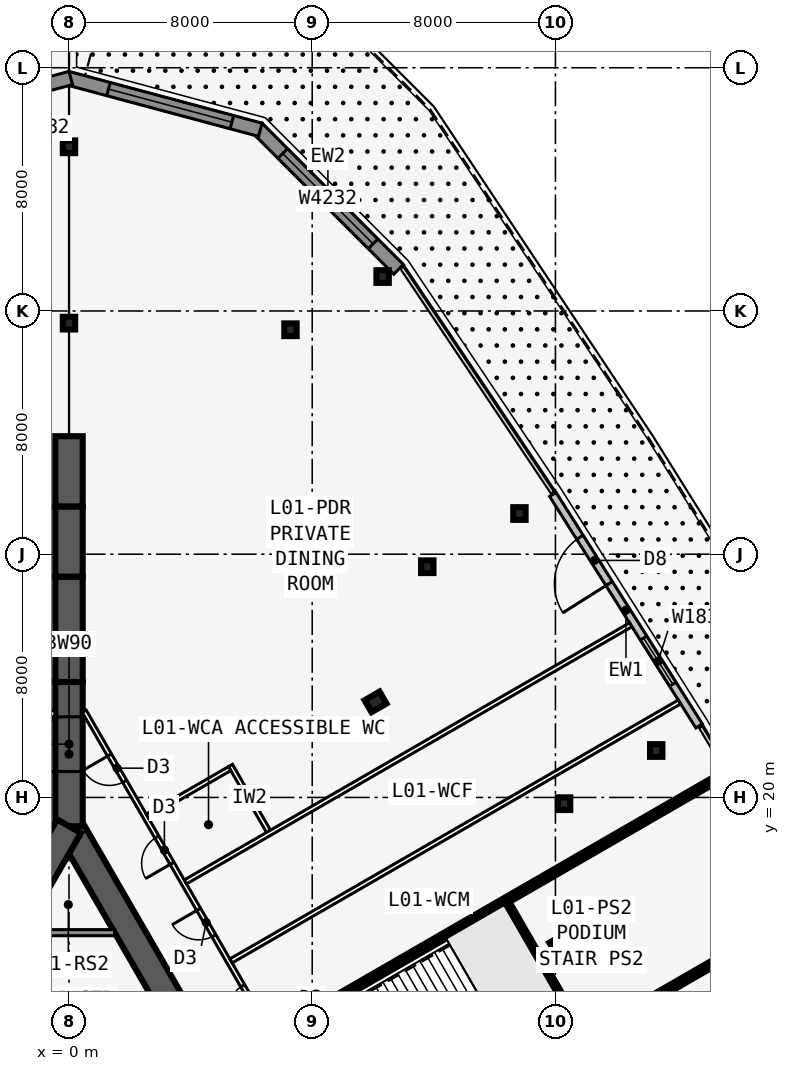
"""IFC4 building model, lengths in metres.
Left out: names, types, materials, properties, quantities, classifications, styles, units other than length and angle.
Written with IfcOpenShell. Run it as: python <this file> out.ifc"""

import sys

from ifc_helpers import new_model, si_unit, direction, frame, frame_2d, origin, origin_2d, place, context, subcontext, project, spatial, rectangle, i_section, extrude, element, fill, save


model = new_model("IFC4")
c1 = context("Model", 3, precision=1e-05, world=origin(), true_north=direction((0.0, 1.0)))
c2 = subcontext(c1, "Body", "Model", "MODEL_VIEW")
j1 = project(units=[si_unit("LENGTHUNIT", "METRE"), si_unit("PLANEANGLEUNIT", "RADIAN")], contexts=[c1])
p1 = place(None, origin())
s1 = spatial("IfcSite", under=j1, at=p1, CompositionType="ELEMENT")
p2 = place(p1, origin())
s2 = spatial("IfcBuilding", under=s1, at=p2, CompositionType="ELEMENT")
p3 = place(p2, frame((0.0, 0.0, 6.0)))
s3 = spatial("IfcBuildingStorey", under=s2, at=p3, CompositionType="ELEMENT", Elevation=6.0)
p4 = place(p3, frame((16.5, -9.526, 0.0), z_axis=(0.0, 0.0, 1.0), x_axis=(-0.499999749417, 0.866025548458, 0.0)))
e1 = element("IfcWall", 1, at=p4, inside=s3, PredefinedType="SHEAR", context=c2, shape_type="SweptSolid", body=[
    extrude(rectangle(XDim=33.0, YDim=0.9, at=frame_2d((16.5, 0.0))), origin(), (0.0, 0.0, 1.0), 5.0),
])
p5 = place(p4, frame((14.15, 0.0, 0.0)))
e2 = element("IfcOpeningElement", 2, at=p5, cuts=e1, PredefinedType="OPENING", context=c2, shape_type="SweptSolid", body=[
    extrude(rectangle(XDim=1.8, YDim=2.13, at=frame_2d((0.9, 1.065))), frame((0.0, 0.46, 0.0), z_axis=(0.0, -1.0, 0.0), x_axis=(1.0, 0.0, 0.0)), (0.0, 0.0, 1.0), 0.92),
])
p6 = place(p4, frame((12.6, 0.0, 0.0)))
e3 = element("IfcOpeningElement", 3, at=p6, cuts=e1, PredefinedType="OPENING", context=c2, shape_type="SweptSolid", body=[
    extrude(rectangle(XDim=1.0, YDim=2.13, at=frame_2d((0.5, 1.065))), frame((0.0, 0.46, 0.0), z_axis=(0.0, -1.0, 0.0), x_axis=(1.0, 0.0, 0.0)), (0.0, 0.0, 1.0), 0.92),
])
p7 = place(p3, frame((0.0, 19.052, 0.0), z_axis=(0.0, 0.0, 1.0), x_axis=(-0.499999749417, -0.866025548458, 0.0)))
e4 = element("IfcWall", 4, at=p7, inside=s3, PredefinedType="SHEAR", context=c2, shape_type="SweptSolid", body=[
    extrude(rectangle(XDim=33.0, YDim=0.9, at=frame_2d((16.5, 0.0))), origin(), (0.0, 0.0, 1.0), 5.0),
])
p8 = place(p7, frame((14.15, 0.0, 0.0)))
e5 = element("IfcOpeningElement", 5, at=p8, cuts=e4, PredefinedType="OPENING", context=c2, shape_type="SweptSolid", body=[
    extrude(rectangle(XDim=1.8, YDim=2.13, at=frame_2d((0.9, 1.065))), frame((0.0, 0.46, 0.0), z_axis=(0.0, -1.0, 0.0), x_axis=(1.0, 0.0, 0.0)), (0.0, 0.0, 1.0), 0.92),
])
p9 = place(p7, frame((12.6, 0.0, 0.0)))
e6 = element("IfcOpeningElement", 6, at=p9, cuts=e4, PredefinedType="OPENING", context=c2, shape_type="SweptSolid", body=[
    extrude(rectangle(XDim=1.0, YDim=2.13, at=frame_2d((0.5, 1.065))), frame((0.0, 0.46, 0.0), z_axis=(0.0, -1.0, 0.0), x_axis=(1.0, 0.0, 0.0)), (0.0, 0.0, 1.0), 0.92),
])
p10 = place(p3, frame((0.0, 19.052, 0.0), z_axis=(0.0, 0.0, 1.0), x_axis=(0.0, 1.0, 0.0)))
e7 = element("IfcWall", 7, at=p10, inside=s3, PredefinedType="SHEAR", context=c2, shape_type="SweptSolid", body=[
    extrude(rectangle(XDim=4.746, YDim=0.9, at=frame_2d((2.373, 0.0))), origin(), (0.0, 0.0, 1.0), 5.0),
])
p11 = place(p10, frame((1.8, 0.0, 0.0)))
e8 = element("IfcOpeningElement", 8, at=p11, cuts=e7, PredefinedType="OPENING", context=c2, shape_type="SweptSolid", body=[
    extrude(rectangle(XDim=1.8, YDim=2.13, at=frame_2d((0.9, 1.065))), frame((0.0, 0.46, 0.0), z_axis=(0.0, -1.0, 0.0), x_axis=(1.0, 0.0, 0.0)), (0.0, 0.0, 1.0), 0.92),
])
p12 = place(p3, frame((0.0, 23.799, 0.0), z_axis=(0.0, 0.0, 1.0), x_axis=(0.0, 1.0, 0.0)))
e9 = element("IfcWall", 9, at=p12, inside=s3, PredefinedType="SHEAR", context=c2, shape_type="SweptSolid", body=[
    extrude(rectangle(XDim=1.155, YDim=0.9, at=frame_2d((0.577, 0.0))), origin(), (0.0, 0.0, 1.0), 5.0),
])
p13 = place(p3, frame((0.0, 24.953, 0.0), z_axis=(0.0, 0.0, 1.0), x_axis=(0.0, 1.0, 0.0)))
e10 = element("IfcWall", 10, at=p13, inside=s3, PredefinedType="SHEAR", context=c2, shape_type="SweptSolid", body=[
    extrude(rectangle(XDim=2.309, YDim=0.9, at=frame_2d((1.155, 0.0))), origin(), (0.0, 0.0, 1.0), 5.0),
])
p14 = place(p3, frame((0.0, 27.263, 0.0), z_axis=(0.0, 0.0, 1.0), x_axis=(0.0, 1.0, 0.0)))
e11 = element("IfcWall", 11, at=p14, inside=s3, PredefinedType="SHEAR", context=c2, shape_type="SweptSolid", body=[
    extrude(rectangle(XDim=2.31, YDim=0.9, at=frame_2d((1.155, 0.0))), origin(), (0.0, 0.0, 1.0), 5.0),
])
p15 = place(p3, frame((0.0, 29.572, 0.0), z_axis=(0.0, 0.0, 1.0), x_axis=(0.0, 1.0, 0.0)))
e12 = element("IfcWall", 12, at=p15, inside=s3, PredefinedType="SHEAR", context=c2, shape_type="SweptSolid", body=[
    extrude(rectangle(XDim=2.309, YDim=0.9, at=frame_2d((1.155, 0.0))), origin(), (0.0, 0.0, 1.0), 5.0),
])
for number, where, z_axis, x_axis in (
    (13, (16.137, 15.09, 0.0), (0.0, 0.0, 1.0), (0.866, 0.5, 0.0)),
    (14, (10.083, 23.142, 0.0), (0.0, 0.0, 1.0), (-0.5, 0.866, 0.0)),
):
    element("IfcColumn", number, at=place(p3, frame(where, z_axis=z_axis, x_axis=x_axis)), inside=s3, PredefinedType="COLUMN", context=c2, shape_type="SweptSolid", body=[
        extrude(i_section(OverallWidth=0.455, OverallDepth=0.569, WebThickness=0.078, FlangeThickness=0.125, at=origin_2d()), origin(), (0.0, 0.0, 1.0), 5.0),
    ])
for number, where, z_axis, x_axis in (
    (15, (0.0, 35.6, 0.0), (0.0, 0.0, 1.0), (1.0, 0.0, 0.0)),
    (16, (0.0, 41.4, 0.0), (0.0, 0.0, 1.0), (1.0, 0.0, 0.0)),
    (17, (11.785, 27.588, 0.0), (0.0, 0.0, 1.0), (1.0, 0.0, 0.0)),
    (18, (7.285, 35.383, 0.0), (0.0, 0.0, 1.0), (1.0, 0.0, 0.0)),
    (19, (16.285, 19.794, 0.0), (0.0, 0.0, 1.0), (1.0, 0.0, 0.0)),
    (20, (14.816, 29.338, 0.0), (0.0, 0.0, 1.0), (1.0, 0.0, 0.0)),
    (21, (10.316, 37.133, 0.0), (0.0, 0.0, 1.0), (1.0, 0.0, 0.0)),
    (22, (19.316, 21.544, 0.0), (0.0, 0.0, 1.0), (1.0, 0.0, 0.0)),
):
    element("IfcColumn", number, at=place(p3, frame(where, z_axis=z_axis, x_axis=x_axis)), inside=s3, PredefinedType="COLUMN", context=c2, shape_type="SweptSolid", body=[
        extrude(i_section(OverallWidth=0.406, OverallDepth=0.417, WebThickness=0.03, FlangeThickness=0.048, at=origin_2d()), origin(), (0.0, 0.0, 1.0), 5.0),
    ])
p16 = place(p3, frame((20.726, 22.353, 0.0), z_axis=(0.0, 0.0, 1.0), x_axis=(-0.534212228641, 0.845350397628, 0.0)))
e23 = element("IfcWall", 23, at=p16, inside=s3, PredefinedType="STANDARD", context=c2, shape_type="SweptSolid", body=[
    extrude(rectangle(XDim=9.007, YDim=0.25, at=frame_2d((4.504, 0.0))), origin(), (0.0, 0.0, 1.0), 4.75),
])
p17 = place(p16, frame((1.62, 0.0, 0.6)))
e24 = element("IfcOpeningElement", 24, at=p17, cuts=e23, PredefinedType="OPENING", context=c2, shape_type="SweptSolid", body=[
    extrude(rectangle(XDim=1.8, YDim=3.2, at=frame_2d((0.9, 1.6))), frame((0.0, 0.135, 0.0), z_axis=(0.0, -1.0, 0.0), x_axis=(1.0, 0.0, 0.0)), (0.0, 0.0, 1.0), 0.27),
])
p18 = place(p16, frame((5.539, 0.0, 0.0)))
e25 = element("IfcOpeningElement", 25, at=p18, cuts=e23, PredefinedType="OPENING", context=c2, shape_type="SweptSolid", body=[
    extrude(rectangle(XDim=1.8, YDim=2.4, at=frame_2d((0.9, 1.2))), frame((0.0, 0.135, 0.0), z_axis=(0.0, -1.0, 0.0), x_axis=(1.0, 0.0, 0.0)), (0.0, 0.0, 1.0), 0.27),
])
p19 = place(p3, frame((10.841, 37.369, 0.0), z_axis=(0.0, 0.0, 1.0), x_axis=(-0.7070882144, 0.707125347486, 0.0)))
e26 = element("IfcWall", 26, at=p19, inside=s3, PredefinedType="SOLIDWALL", context=c2, shape_type="SweptSolid", body=[
    extrude(rectangle(XDim=6.575, YDim=0.45, at=frame_2d((3.287, 0.0))), origin(), (0.0, 0.0, 1.0), 4.75),
])
p20 = place(p19, frame((1.188, 0.0, 0.6)))
e27 = element("IfcOpeningElement", 27, at=p20, cuts=e26, PredefinedType="OPENING", context=c2, shape_type="SweptSolid", body=[
    extrude(rectangle(XDim=4.2, YDim=3.2, at=frame_2d((2.1, 1.6))), frame((0.0, 0.235, 0.0), z_axis=(0.0, -1.0, 0.0), x_axis=(1.0, 0.0, 0.0)), (0.0, 0.0, 1.0), 0.47),
])
p21 = place(p3, frame((6.293, 41.96, 0.0), z_axis=(0.0, 0.0, 1.0), x_axis=(-0.96592733332, 0.258813420722, 0.0)))
e28 = element("IfcWall", 28, at=p21, inside=s3, PredefinedType="SOLIDWALL", context=c2, shape_type="SweptSolid", body=[
    extrude(rectangle(XDim=6.575, YDim=0.45, at=frame_2d((3.288, 0.0))), origin(), (0.0, 0.0, 1.0), 4.75),
])
p22 = place(p21, frame((0.969, 0.0, 0.6)))
e29 = element("IfcOpeningElement", 29, at=p22, cuts=e28, PredefinedType="OPENING", context=c2, shape_type="SweptSolid", body=[
    extrude(rectangle(XDim=4.2, YDim=3.2, at=frame_2d((2.1, 1.6))), frame((0.0, 0.235, 0.0), z_axis=(0.0, -1.0, 0.0), x_axis=(1.0, 0.0, 0.0)), (0.0, 0.0, 1.0), 0.47),
])
p23 = place(p3, frame((0.058, 43.661, 0.0), z_axis=(0.0, 0.0, 1.0), x_axis=(-0.96592733332, -0.258813420722, 0.0)))
e30 = element("IfcWall", 30, at=p23, inside=s3, PredefinedType="SOLIDWALL", context=c2, shape_type="SweptSolid", body=[
    extrude(rectangle(XDim=6.575, YDim=0.45, at=frame_2d((3.288, 0.0))), origin(), (0.0, 0.0, 1.0), 4.75),
])
p24 = place(p23, frame((3.056, 0.0, 0.0)))
e31 = element("IfcOpeningElement", 31, at=p24, cuts=e30, PredefinedType="OPENING", context=c2, shape_type="SweptSolid", body=[
    extrude(rectangle(XDim=0.9, YDim=2.13, at=frame_2d((0.45, 1.065))), frame((0.0, 0.235, 0.0), z_axis=(0.0, -1.0, 0.0), x_axis=(1.0, 0.0, 0.0)), (0.0, 0.0, 1.0), 0.47),
])
p25 = place(p23, frame((1.146, 0.0, 0.6)))
e32 = element("IfcOpeningElement", 32, at=p25, cuts=e30, PredefinedType="OPENING", context=c2, shape_type="SweptSolid", body=[
    extrude(rectangle(XDim=1.2, YDim=3.2, at=frame_2d((0.6, 1.6))), frame((0.0, 0.235, 0.0), z_axis=(0.0, -1.0, 0.0), x_axis=(1.0, 0.0, 0.0)), (0.0, 0.0, 1.0), 0.47),
])
p26 = place(p23, frame((4.665, 0.0, 0.6)))
e33 = element("IfcOpeningElement", 33, at=p26, cuts=e30, PredefinedType="OPENING", context=c2, shape_type="SweptSolid", body=[
    extrude(rectangle(XDim=1.2, YDim=3.2, at=frame_2d((0.6, 1.6))), frame((0.0, 0.235, 0.0), z_axis=(0.0, -1.0, 0.0), x_axis=(1.0, 0.0, 0.0)), (0.0, 0.0, 1.0), 0.47),
])
p27 = place(p3, frame((20.027, -10.985, 0.0), z_axis=(0.0, 0.0, 1.0), x_axis=(-0.500001677587, 0.866024435227, 0.0)))
e34 = element("IfcWall", 34, at=p27, inside=s3, PredefinedType="PARTITIONING", context=c2, shape_type="SweptSolid", body=[
    extrude(rectangle(XDim=39.054, YDim=0.15, at=frame_2d((19.527, 0.0))), origin(), (0.0, 0.0, 1.0), 3.808),
])
p28 = place(p27, frame((10.013, 0.0, 0.0)))
e35 = element("IfcOpeningElement", 35, at=p28, cuts=e34, PredefinedType="OPENING", context=c2, shape_type="SweptSolid", body=[
    extrude(rectangle(XDim=1.8, YDim=2.13, at=frame_2d((0.9, 1.065))), frame((0.0, 0.085, 0.0), z_axis=(0.0, -1.0, 0.0), x_axis=(1.0, 0.0, 0.0)), (0.0, 0.0, 1.0), 0.17),
])
p29 = place(p27, frame((23.227, 0.0, 0.0)))
e36 = element("IfcOpeningElement", 36, at=p29, cuts=e34, PredefinedType="OPENING", context=c2, shape_type="SweptSolid", body=[
    extrude(rectangle(XDim=1.8, YDim=2.13, at=frame_2d((0.9, 1.065))), frame((0.0, 0.085, 0.0), z_axis=(0.0, -1.0, 0.0), x_axis=(1.0, 0.0, 0.0)), (0.0, 0.0, 1.0), 0.17),
])
p30 = place(p27, frame((27.627, 0.0, 0.0)))
e37 = element("IfcOpeningElement", 37, at=p30, cuts=e34, PredefinedType="OPENING", context=c2, shape_type="SweptSolid", body=[
    extrude(rectangle(XDim=1.0, YDim=2.13, at=frame_2d((0.5, 1.065))), frame((0.0, 0.085, 0.0), z_axis=(0.0, -1.0, 0.0), x_axis=(1.0, 0.0, 0.0)), (0.0, 0.0, 1.0), 0.17),
])
p31 = place(p27, frame((30.527, 0.0, 0.0)))
e38 = element("IfcOpeningElement", 38, at=p31, cuts=e34, PredefinedType="OPENING", context=c2, shape_type="SweptSolid", body=[
    extrude(rectangle(XDim=1.0, YDim=2.13, at=frame_2d((0.5, 1.065))), frame((0.0, 0.085, 0.0), z_axis=(0.0, -1.0, 0.0), x_axis=(1.0, 0.0, 0.0)), (0.0, 0.0, 1.0), 0.17),
])
p32 = place(p27, frame((33.277, 0.0, 0.0)))
e39 = element("IfcOpeningElement", 39, at=p32, cuts=e34, PredefinedType="OPENING", context=c2, shape_type="SweptSolid", body=[
    extrude(rectangle(XDim=1.0, YDim=2.13, at=frame_2d((0.5, 1.065))), frame((0.0, 0.085, 0.0), z_axis=(0.0, -1.0, 0.0), x_axis=(1.0, 0.0, 0.0)), (0.0, 0.0, 1.0), 0.17),
])
p33 = place(p27, frame((36.39, 0.0, 0.0)))
e40 = element("IfcOpeningElement", 40, at=p33, cuts=e34, PredefinedType="OPENING", context=c2, shape_type="SweptSolid", body=[
    extrude(rectangle(XDim=1.0, YDim=2.13, at=frame_2d((0.5, 1.065))), frame((0.0, 0.085, 0.0), z_axis=(0.0, -1.0, 0.0), x_axis=(1.0, 0.0, 0.0)), (0.0, 0.0, 1.0), 0.17),
])
p34 = place(p3, frame((9.329, 7.695, 0.0), z_axis=(0.0, 0.0, 1.0), x_axis=(0.866030143687, 0.499991790157, 0.0)))
e41 = element("IfcWall", 41, at=p34, inside=s3, PredefinedType="SHEAR", context=c2, shape_type="SweptSolid", body=[
    extrude(rectangle(XDim=17.236, YDim=0.2, at=frame_2d((8.618, 0.0))), origin(), (0.0, 0.0, 1.0), 5.0),
])
p35 = place(p3, frame((6.729, 12.198, 0.0), z_axis=(0.0, 0.0, 1.0), x_axis=(0.866023831254, 0.500002723692, 0.0)))
e42 = element("IfcWall", 42, at=p35, inside=s3, PredefinedType="SHEAR", context=c2, shape_type="SweptSolid", body=[
    extrude(rectangle(XDim=17.167, YDim=0.2, at=frame_2d((8.583, 0.0))), origin(), (0.0, 0.0, 1.0), 5.0),
])
p36 = place(p3, frame((5.329, 14.623, 0.0), z_axis=(0.0, 0.0, 1.0), x_axis=(0.866023280993, 0.500003676764, 0.0)))
e43 = element("IfcWall", 43, at=p36, inside=s3, PredefinedType="PARTITIONING", context=c2, shape_type="SweptSolid", body=[
    extrude(rectangle(XDim=17.033, YDim=0.15, at=frame_2d((8.517, 0.0))), origin(), (0.0, 0.0, 1.0), 3.808),
])
p37 = place(p3, frame((3.829, 17.221, 0.0), z_axis=(0.0, 0.0, 1.0), x_axis=(0.86602357085, 0.500003174723, 0.0)))
e44 = element("IfcWall", 44, at=p37, inside=s3, PredefinedType="PARTITIONING", context=c2, shape_type="SweptSolid", body=[
    extrude(rectangle(XDim=16.914, YDim=0.15, at=frame_2d((8.457, 0.0))), origin(), (0.0, 0.0, 1.0), 4.75),
])
p38 = place(p3, frame((6.562, 18.886, 0.0), z_axis=(0.0, 0.0, 1.0), x_axis=(-0.500004234368, 0.866022959057, 0.0)))
e45 = element("IfcWall", 45, at=p38, inside=s3, PredefinedType="PARTITIONING", context=c2, shape_type="SweptSolid", body=[
    extrude(rectangle(XDim=2.5, YDim=0.15, at=frame_2d((1.25, 0.0))), origin(), (0.0, 0.0, 1.0), 4.75),
])
p39 = place(p3, frame((2.579, 19.386, 0.0), z_axis=(0.0, 0.0, 1.0), x_axis=(0.866022959057, 0.500004234368, 0.0)))
e46 = element("IfcWall", 46, at=p39, inside=s3, PredefinedType="PARTITIONING", context=c2, shape_type="SweptSolid", body=[
    extrude(rectangle(XDim=3.125, YDim=0.15, at=frame_2d((1.562, 0.0))), origin(), (0.0, 0.0, 1.0), 4.75),
])
p40 = place(p3, frame((-0.5, 22.836, 0.0), z_axis=(0.0, 0.0, 1.0), x_axis=(-0.500001677587, -0.866024435227, 0.0)))
e47 = element("IfcWall", 47, at=p40, inside=s3, PredefinedType="PARTITIONING", context=c2, shape_type="SweptSolid", body=[
    extrude(rectangle(XDim=39.054, YDim=0.15, at=frame_2d((19.527, 0.0))), origin(), (0.0, 0.0, 1.0), 3.808),
])
p41 = place(p40, frame((10.013, 0.0, 0.0)))
e48 = element("IfcOpeningElement", 48, at=p41, cuts=e47, PredefinedType="OPENING", context=c2, shape_type="SweptSolid", body=[
    extrude(rectangle(XDim=1.8, YDim=2.13, at=frame_2d((0.9, 1.065))), frame((0.0, 0.085, 0.0), z_axis=(0.0, -1.0, 0.0), x_axis=(1.0, 0.0, 0.0)), (0.0, 0.0, 1.0), 0.17),
])
p42 = place(p40, frame((23.227, 0.0, 0.0)))
e49 = element("IfcOpeningElement", 49, at=p42, cuts=e47, PredefinedType="OPENING", context=c2, shape_type="SweptSolid", body=[
    extrude(rectangle(XDim=1.8, YDim=2.13, at=frame_2d((0.9, 1.065))), frame((0.0, 0.085, 0.0), z_axis=(0.0, -1.0, 0.0), x_axis=(1.0, 0.0, 0.0)), (0.0, 0.0, 1.0), 0.17),
])
p43 = place(p40, frame((27.627, 0.0, 0.0)))
e50 = element("IfcOpeningElement", 50, at=p43, cuts=e47, PredefinedType="OPENING", context=c2, shape_type="SweptSolid", body=[
    extrude(rectangle(XDim=1.0, YDim=2.13, at=frame_2d((0.5, 1.065))), frame((0.0, 0.085, 0.0), z_axis=(0.0, -1.0, 0.0), x_axis=(1.0, 0.0, 0.0)), (0.0, 0.0, 1.0), 0.17),
])
p44 = place(p40, frame((30.277, 0.0, 0.0)))
e51 = element("IfcOpeningElement", 51, at=p44, cuts=e47, PredefinedType="OPENING", context=c2, shape_type="SweptSolid", body=[
    extrude(rectangle(XDim=1.0, YDim=2.13, at=frame_2d((0.5, 1.065))), frame((0.0, 0.085, 0.0), z_axis=(0.0, -1.0, 0.0), x_axis=(1.0, 0.0, 0.0)), (0.0, 0.0, 1.0), 0.17),
])
p45 = place(p40, frame((34.89, 0.0, 0.0)))
e52 = element("IfcOpeningElement", 52, at=p45, cuts=e47, PredefinedType="OPENING", context=c2, shape_type="SweptSolid", body=[
    extrude(rectangle(XDim=1.0, YDim=2.13, at=frame_2d((0.5, 1.065))), frame((0.0, 0.085, 0.0), z_axis=(0.0, -1.0, 0.0), x_axis=(1.0, 0.0, 0.0)), (0.0, 0.0, 1.0), 0.17),
])
p46 = place(p3, frame((-1.501, 15.552, 0.0), z_axis=(0.0, 0.0, 1.0), x_axis=(1.0, 0.0, 0.0)))
e53 = element("IfcWall", 53, at=p46, inside=s3, PredefinedType="SOLIDWALL", context=c2, shape_type="SweptSolid", body=[
    extrude(rectangle(XDim=3.002, YDim=0.2, at=frame_2d((1.501, 0.0))), origin(), (0.0, 0.0, 1.0), 4.75),
])
p47 = place(p3, frame((16.949, 12.095, 0.0), z_axis=(0.0, 0.0, 1.0), x_axis=(-0.499992051641, 0.866029992723, 0.0)))
e54 = element("IfcWall", 54, at=p47, inside=s3, PredefinedType="SHEAR", context=c2, shape_type="SweptSolid", body=[
    extrude(rectangle(XDim=5.2, YDim=0.2, at=frame_2d((2.6, 0.0))), origin(), (0.0, 0.0, 1.0), 5.0),
])
p48 = place(p17, origin())
e55 = element("IfcWindow", 55, at=p48, inside=s3, PartitioningType="SINGLE_PANEL", PredefinedType="WINDOW", context=c2, shape_type="SweptSolid", body=[
    extrude(rectangle(XDim=1.8, YDim=3.2, at=frame_2d((0.9, 1.6))), frame((0.0, 0.03, 0.0), z_axis=(0.0, -1.0, 0.0), x_axis=(1.0, 0.0, 0.0)), (0.0, 0.0, 1.0), 0.06),
])
fill(e24, e55)
p49 = place(p18, origin())
e56 = element("IfcDoor", 56, at=p49, inside=s3, OperationType="DOUBLE_DOOR_SINGLE_SWING", PredefinedType="DOOR", context=c2, shape_type="SweptSolid", body=[
    extrude(rectangle(XDim=1.8, YDim=2.4, at=frame_2d((0.9, 1.2))), frame((0.0, 0.025, 0.0), z_axis=(0.0, -1.0, 0.0), x_axis=(1.0, 0.0, 0.0)), (0.0, 0.0, 1.0), 0.05),
])
fill(e25, e56)
p50 = place(p20, origin())
e57 = element("IfcWindow", 57, at=p50, inside=s3, PartitioningType="SINGLE_PANEL", PredefinedType="WINDOW", context=c2, shape_type="SweptSolid", body=[
    extrude(rectangle(XDim=4.2, YDim=3.2, at=frame_2d((2.1, 1.6))), frame((0.0, 0.03, 0.0), z_axis=(0.0, -1.0, 0.0), x_axis=(1.0, 0.0, 0.0)), (0.0, 0.0, 1.0), 0.06),
])
fill(e27, e57)
p51 = place(p22, origin())
e58 = element("IfcWindow", 58, at=p51, inside=s3, PartitioningType="SINGLE_PANEL", PredefinedType="WINDOW", context=c2, shape_type="SweptSolid", body=[
    extrude(rectangle(XDim=4.2, YDim=3.2, at=frame_2d((2.1, 1.6))), frame((0.0, 0.03, 0.0), z_axis=(0.0, -1.0, 0.0), x_axis=(1.0, 0.0, 0.0)), (0.0, 0.0, 1.0), 0.06),
])
fill(e29, e58)
p52 = place(p30, origin())
e59 = element("IfcDoor", 59, at=p52, inside=s3, OperationType="SINGLE_SWING_LEFT", PredefinedType="DOOR", context=c2, shape_type="SweptSolid", body=[
    extrude(rectangle(XDim=1.0, YDim=2.13, at=frame_2d((0.5, 1.065))), frame((0.0, 0.025, 0.0), z_axis=(0.0, -1.0, 0.0), x_axis=(1.0, 0.0, 0.0)), (0.0, 0.0, 1.0), 0.05),
])
fill(e37, e59)
p53 = place(p31, origin())
e60 = element("IfcDoor", 60, at=p53, inside=s3, OperationType="SINGLE_SWING_RIGHT", PredefinedType="DOOR", context=c2, shape_type="SweptSolid", body=[
    extrude(rectangle(XDim=1.0, YDim=2.13, at=frame_2d((0.5, 1.065))), frame((0.0, 0.025, 0.0), z_axis=(0.0, -1.0, 0.0), x_axis=(1.0, 0.0, 0.0)), (0.0, 0.0, 1.0), 0.05),
])
fill(e38, e60)
p54 = place(p32, origin())
e61 = element("IfcDoor", 61, at=p54, inside=s3, OperationType="SINGLE_SWING_LEFT", PredefinedType="DOOR", context=c2, shape_type="SweptSolid", body=[
    extrude(rectangle(XDim=1.0, YDim=2.13, at=frame_2d((0.5, 1.065))), frame((0.0, 0.025, 0.0), z_axis=(0.0, -1.0, 0.0), x_axis=(1.0, 0.0, 0.0)), (0.0, 0.0, 1.0), 0.05),
])
fill(e39, e61)
p55 = place(p33, origin())
e62 = element("IfcDoor", 62, at=p55, inside=s3, OperationType="SINGLE_SWING_RIGHT", PredefinedType="DOOR", context=c2, shape_type="SweptSolid", body=[
    extrude(rectangle(XDim=1.0, YDim=2.13, at=frame_2d((0.5, 1.065))), frame((0.0, 0.025, 0.0), z_axis=(0.0, -1.0, 0.0), x_axis=(1.0, 0.0, 0.0)), (0.0, 0.0, 1.0), 0.05),
])
fill(e40, e62)
p56 = place(p11, origin())
e63 = element("IfcDoor", 63, at=p56, inside=s3, OperationType="DOUBLE_DOOR_DOUBLE_SWING", PredefinedType="DOOR", context=c2, shape_type="SweptSolid", body=[
    extrude(rectangle(XDim=1.8, YDim=2.13, at=frame_2d((0.9, 1.065))), frame((0.0, 0.025, 0.0), z_axis=(0.0, -1.0, 0.0), x_axis=(1.0, 0.0, 0.0)), (0.0, 0.0, 1.0), 0.05),
])
fill(e8, e63)
save(model, sys.argv[1])
